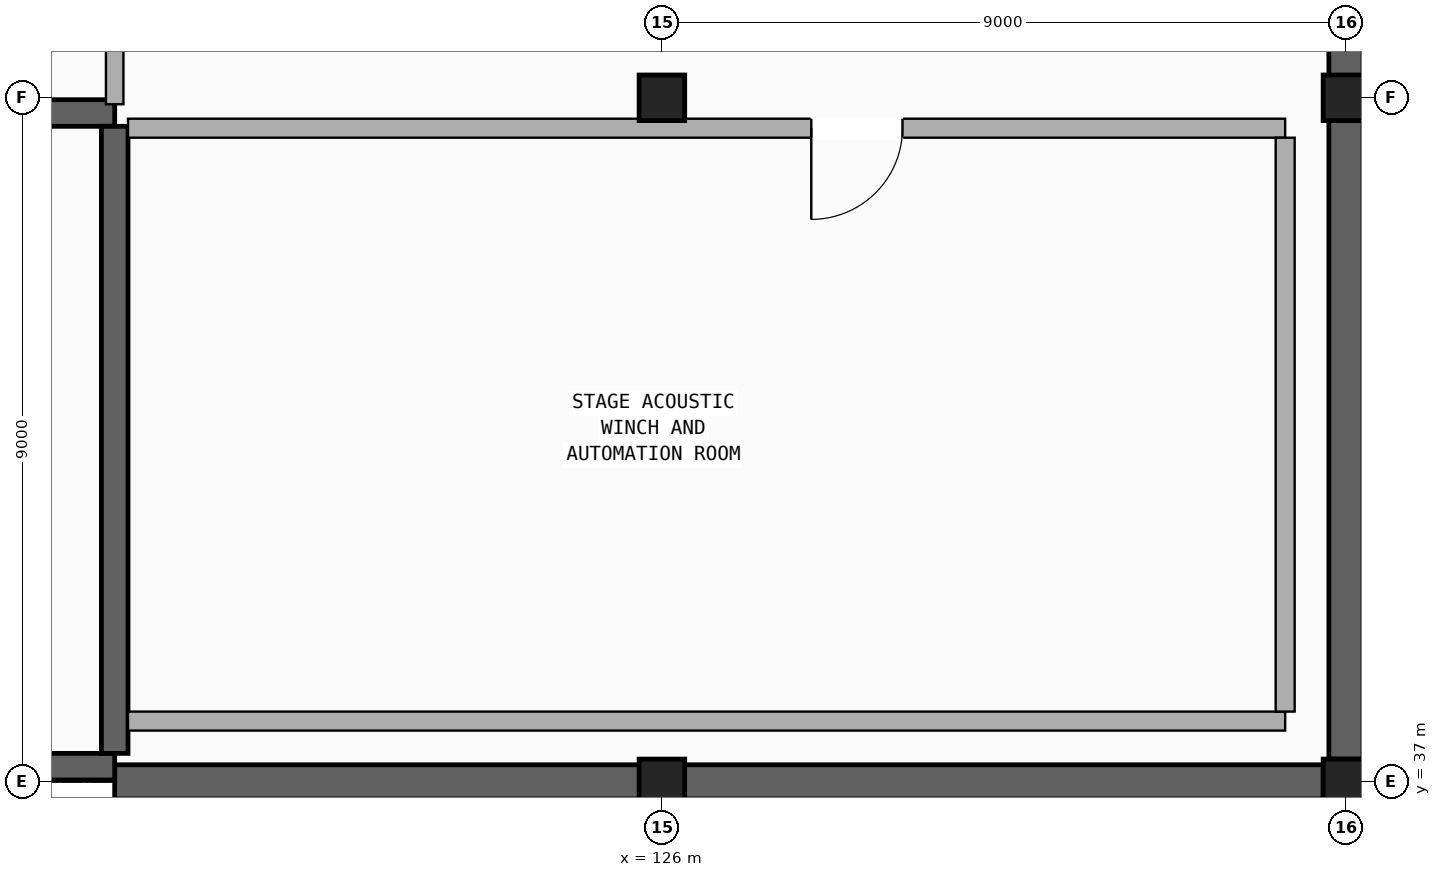
"""IFC4 building model, lengths in metres.
Left out: names, types, materials, properties, quantities, classifications, styles, units other than length and angle.
Written with IfcOpenShell. Run it as: python <this file> out.ifc"""

import sys

from ifc_helpers import new_model, si_unit, direction, frame, frame_2d, origin, origin_2d, place, context, subcontext, project, spatial, polyline, rectangle, outline, extrude, element, fill, save


model = new_model("IFC4")
c1 = context("Model", 3, precision=1e-05, world=origin(), true_north=direction((0.0, 1.0)))
c2 = subcontext(c1, "Body", "Model", "MODEL_VIEW")
j1 = project(units=[si_unit("LENGTHUNIT", "METRE"), si_unit("PLANEANGLEUNIT", "RADIAN")], contexts=[c1])
p1 = place(None, origin())
s1 = spatial("IfcSite", under=j1, at=p1, CompositionType="ELEMENT")
p2 = place(p1, origin())
s2 = spatial("IfcBuilding", under=s1, at=p2, CompositionType="ELEMENT")
p3 = place(p2, frame((0.0, 0.0, 21.76)))
s3 = spatial("IfcBuildingStorey", under=s2, at=p3, CompositionType="ELEMENT", Elevation=21.76)
for number, where, z_axis, x_axis in (
    (1, (126.0, 37.0, 0.0), (0.0, 0.0, 1.0), (1.0, 0.0, 0.0)),
    (2, (126.0, 46.0, 0.0), (0.0, 0.0, 1.0), (1.0, 0.0, 0.0)),
):
    element("IfcColumn", number, at=place(p3, frame(where, z_axis=z_axis, x_axis=x_axis)), inside=s3, PredefinedType="COLUMN", context=c2, shape_type="SweptSolid", body=[
        extrude(rectangle(XDim=0.6, YDim=0.6, at=origin_2d()), origin(), (0.0, 0.0, 1.0), 8.602),
    ])
for number, where, z_axis, x_axis in (
    (3, (135.0, 37.0, 0.0), (0.0, 0.0, 1.0), (1.0, 0.0, 0.0)),
    (4, (135.0, 46.0, 0.0), (0.0, 0.0, 1.0), (1.0, 0.0, 0.0)),
):
    element("IfcColumn", number, at=place(p3, frame(where, z_axis=z_axis, x_axis=x_axis)), inside=s3, PredefinedType="COLUMN", context=c2, shape_type="SweptSolid", body=[
        extrude(rectangle(XDim=0.6, YDim=0.6, at=origin_2d()), origin(), (0.0, 0.0, 1.0), 7.129),
    ])
p4 = place(p3, frame((118.8, 37.0, 0.0), z_axis=(0.0, 0.0, 1.0), x_axis=(1.0, 0.0, 0.0)))
e5 = element("IfcWall", 5, at=p4, inside=s3, PredefinedType="SHEAR", context=c2, shape_type="SweptSolid", body=[
    extrude(outline(polyline([(0.0, 0.0), (15.9, 0.0), (15.9, 6.998), (0.0, 9.6), (0.0, 0.0)])), frame((0.0, 0.225, 0.0), z_axis=(0.0, -1.0, 0.0), x_axis=(1.0, 0.0, 0.0)), (0.0, 0.0, 1.0), 0.45),
])
p5 = place(p3, frame((135.0, 37.3, 0.0), z_axis=(0.0, 0.0, 1.0), x_axis=(0.0, 1.0, 0.0)))
e6 = element("IfcWall", 6, at=p5, inside=s3, PredefinedType="SHEAR", context=c2, shape_type="SweptSolid", body=[
    extrude(rectangle(XDim=37.4, YDim=0.45, at=frame_2d((18.7, 0.0))), origin(), (0.0, 0.0, 1.0), 6.949),
])
p6 = place(p3, frame((108.5, 37.2, 0.0), z_axis=(0.0, 0.0, 1.0), x_axis=(1.0, 0.0, 0.0)))
e7 = element("IfcWall", 7, at=p6, inside=s3, PredefinedType="SHEAR", context=c2, shape_type="SweptSolid", body=[
    extrude(rectangle(XDim=10.3, YDim=0.35, at=frame_2d((5.15, 0.0))), origin(), (0.0, 0.0, 1.0), 9.78),
])
p7 = place(p3, frame((108.5, 45.8, 0.0), z_axis=(0.0, 0.0, 1.0), x_axis=(1.0, 0.0, 0.0)))
e8 = element("IfcWall", 8, at=p7, inside=s3, PredefinedType="SHEAR", context=c2, shape_type="SweptSolid", body=[
    extrude(rectangle(XDim=10.3, YDim=0.35, at=frame_2d((5.15, 0.0))), origin(), (0.0, 0.0, 1.0), 9.78),
])
p8 = place(p7, frame((0.45, 0.0, 0.0)))
e9 = element("IfcOpeningElement", 9, at=p8, cuts=e8, PredefinedType="OPENING", context=c2, shape_type="SweptSolid", body=[
    extrude(rectangle(XDim=1.1, YDim=2.2, at=frame_2d((0.55, 1.1))), frame((0.0, 0.185, 0.0), z_axis=(0.0, -1.0, 0.0), x_axis=(1.0, 0.0, 0.0)), (0.0, 0.0, 1.0), 0.37),
])
p9 = place(p3, frame((118.8, 37.375, 0.0), z_axis=(0.0, 0.0, 1.0), x_axis=(0.0, 1.0, 0.0)))
e10 = element("IfcWall", 10, at=p9, inside=s3, PredefinedType="SHEAR", context=c2, shape_type="SweptSolid", body=[
    extrude(rectangle(XDim=8.25, YDim=0.35, at=frame_2d((4.125, 0.0))), origin(), (0.0, 0.0, 1.0), 9.78),
])
p10 = place(p3, frame((118.8, 45.915, 0.0), z_axis=(0.0, 0.0, 1.0), x_axis=(0.0, 1.0, 0.0)))
e11 = element("IfcWall", 11, at=p10, inside=s3, PredefinedType="PARTITIONING", context=c2, shape_type="SweptSolid", body=[
    extrude(rectangle(XDim=3.77, YDim=0.23, at=frame_2d((1.885, 0.0))), origin(), (0.0, 0.0, 1.0), 8.78),
])
p11 = place(p3, frame((118.975, 37.8, 0.0), z_axis=(0.0, 0.0, 1.0), x_axis=(1.0, 0.0, 0.0)))
e12 = element("IfcWall", 12, at=p11, inside=s3, PredefinedType="PARTITIONING", context=c2, shape_type="SweptSolid", body=[
    extrude(rectangle(XDim=15.225, YDim=0.25, at=frame_2d((7.612, 0.0))), origin(), (0.0, 0.0, 1.0), 4.974),
])
p12 = place(p3, frame((118.975, 45.6, 0.0), z_axis=(0.0, 0.0, 1.0), x_axis=(1.0, 0.0, 0.0)))
e13 = element("IfcWall", 13, at=p12, inside=s3, PredefinedType="PARTITIONING", context=c2, shape_type="SweptSolid", body=[
    extrude(rectangle(XDim=15.225, YDim=0.25, at=frame_2d((7.612, 0.0))), origin(), (0.0, 0.0, 1.0), 4.974),
])
p13 = place(p12, frame((8.99, 0.0, 0.0)))
e14 = element("IfcOpeningElement", 14, at=p13, cuts=e13, PredefinedType="OPENING", context=c2, shape_type="SweptSolid", body=[
    extrude(rectangle(XDim=1.2, YDim=2.2, at=frame_2d((0.6, 1.1))), frame((0.0, 0.135, 0.0), z_axis=(0.0, -1.0, 0.0), x_axis=(1.0, 0.0, 0.0)), (0.0, 0.0, 1.0), 0.27),
])
p14 = place(p3, frame((134.2, 37.925, 0.0), z_axis=(0.0, 0.0, 1.0), x_axis=(0.0, 1.0, 0.0)))
e15 = element("IfcWall", 15, at=p14, inside=s3, PredefinedType="PARTITIONING", context=c2, shape_type="SweptSolid", body=[
    extrude(rectangle(XDim=7.55, YDim=0.25, at=frame_2d((3.775, 0.0))), origin(), (0.0, 0.0, 1.0), 7.08),
])
p15 = place(p13, frame((1.2, 0.0, 0.0), z_axis=(0.0, 0.0, 1.0), x_axis=(-1.0, 0.0, 0.0)))
e16 = element("IfcDoor", 16, at=p15, inside=s3, OperationType="SINGLE_SWING_RIGHT", PredefinedType="DOOR", context=c2, shape_type="SweptSolid", body=[
    extrude(rectangle(XDim=1.2, YDim=2.2, at=frame_2d((0.6, 1.1))), frame((0.0, 0.025, 0.0), z_axis=(0.0, -1.0, 0.0), x_axis=(1.0, 0.0, 0.0)), (0.0, 0.0, 1.0), 0.05),
])
fill(e14, e16)
save(model, sys.argv[1])
